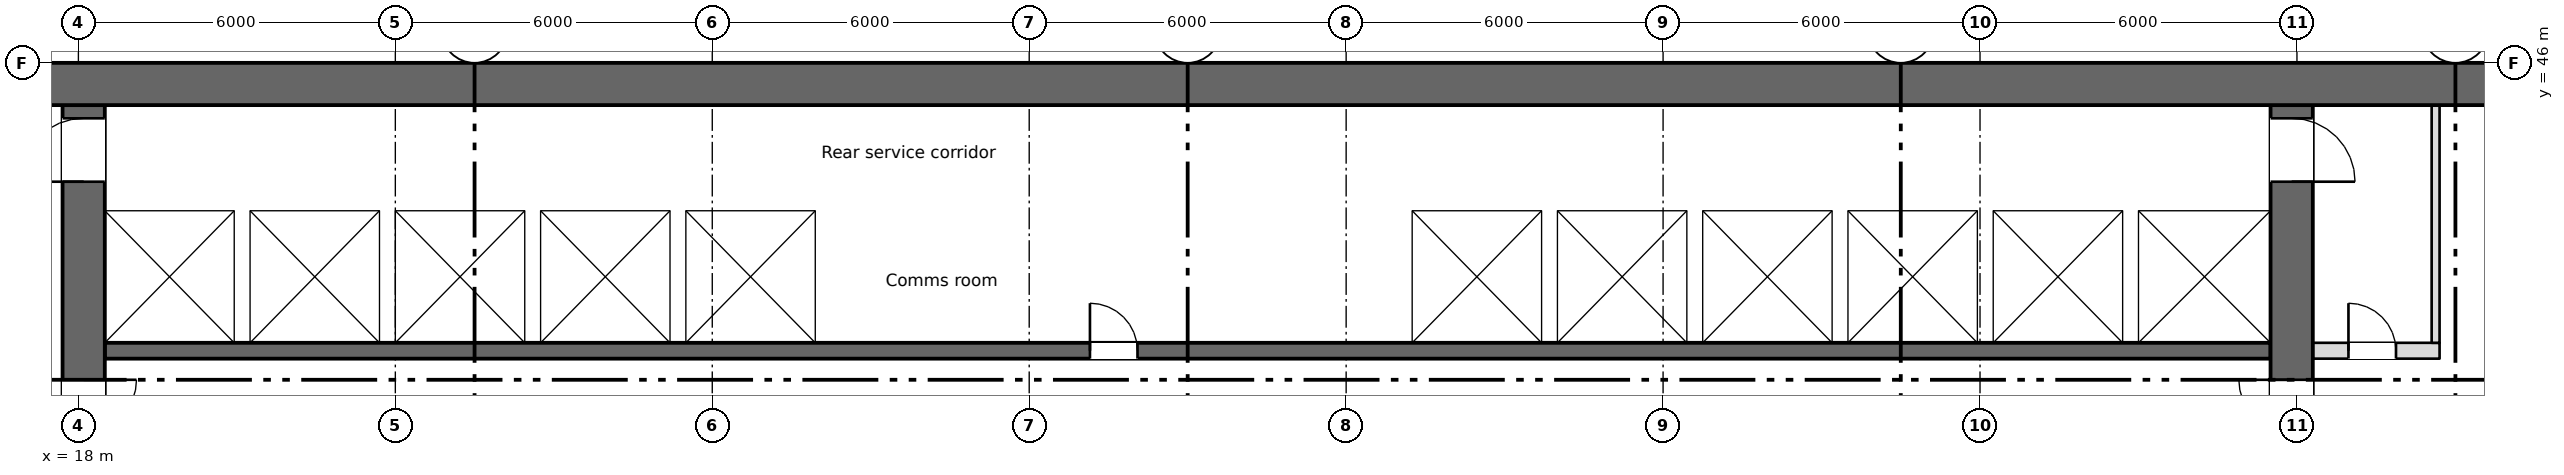
"""IFC4 building model, lengths in metres.
Left out: names, types, materials, properties, quantities, classifications, styles, units other than length and angle.
Written with IfcOpenShell. Run it as: python <this file> out.ifc"""

import sys

from ifc_helpers import new_model, si_unit, direction, frame, frame_2d, origin, place, context, subcontext, project, spatial, rectangle, extrude, element, fill, save


model = new_model("IFC4")
c1 = context("Model", 3, precision=1e-05, world=origin(), true_north=direction((0.0, 1.0)))
c2 = subcontext(c1, "Body", "Model", "MODEL_VIEW")
j1 = project(units=[si_unit("LENGTHUNIT", "METRE"), si_unit("PLANEANGLEUNIT", "RADIAN")], contexts=[c1])
p1 = place(None, origin())
s1 = spatial("IfcSite", under=j1, at=p1, CompositionType="ELEMENT")
p2 = place(p1, origin())
s2 = spatial("IfcBuilding", under=s1, at=p2, CompositionType="ELEMENT")
p3 = place(p2, frame((0.0, 0.0, 98.75)))
s3 = spatial("IfcBuildingStorey", under=s2, at=p3, CompositionType="ELEMENT", Elevation=98.75)
p4 = place(p3, frame((5.55, 45.6, 0.0), z_axis=(0.0, 0.0, 1.0), x_axis=(1.0, 0.0, 0.0)))
e1 = element("IfcWall", 1, at=p4, inside=s3, PredefinedType="SHEAR", context=c2, shape_type="SweptSolid", body=[
    extrude(rectangle(XDim=60.9, YDim=0.8, at=frame_2d((30.45, 0.0))), origin(), (0.0, 0.0, 1.0), 3.35),
])
p5 = place(p4, frame((1.2, 0.0, 0.6)))
e2 = element("IfcOpeningElement", 2, at=p5, cuts=e1, PredefinedType="OPENING", context=c2, shape_type="SweptSolid", body=[
    extrude(rectangle(XDim=0.6, YDim=2.4, at=frame_2d((0.3, 1.2))), frame((0.0, 0.41, 0.0), z_axis=(0.0, -1.0, 0.0), x_axis=(1.0, 0.0, 0.0)), (0.0, 0.0, 1.0), 0.82),
])
p6 = place(p4, frame((7.2, 0.0, 0.6)))
e3 = element("IfcOpeningElement", 3, at=p6, cuts=e1, PredefinedType="OPENING", context=c2, shape_type="SweptSolid", body=[
    extrude(rectangle(XDim=0.6, YDim=2.4, at=frame_2d((0.3, 1.2))), frame((0.0, 0.41, 0.0), z_axis=(0.0, -1.0, 0.0), x_axis=(1.0, 0.0, 0.0)), (0.0, 0.0, 1.0), 0.82),
])
p7 = place(p3, frame((18.1, 28.4, 0.0), z_axis=(0.0, 0.0, 1.0), x_axis=(0.0, 1.0, 0.0)))
e4 = element("IfcWall", 4, at=p7, inside=s3, PredefinedType="SHEAR", context=c2, shape_type="SweptSolid", body=[
    extrude(rectangle(XDim=16.8, YDim=0.8, at=frame_2d((8.4, 0.0))), origin(), (0.0, 0.0, 1.0), 3.35),
])
p8 = place(p7, frame((9.6, 0.0, 0.0)))
e5 = element("IfcOpeningElement", 5, at=p8, cuts=e4, PredefinedType="OPENING", context=c2, shape_type="SweptSolid", body=[
    extrude(rectangle(XDim=2.0, YDim=2.1, at=frame_2d((1.0, 1.05))), frame((0.0, 0.41, 0.0), z_axis=(0.0, -1.0, 0.0), x_axis=(1.0, 0.0, 0.0)), (0.0, 0.0, 1.0), 0.82),
])
p9 = place(p7, frame((15.35, 0.0, 0.0)))
e6 = element("IfcOpeningElement", 6, at=p9, cuts=e4, PredefinedType="OPENING", context=c2, shape_type="SweptSolid", body=[
    extrude(rectangle(XDim=1.2, YDim=2.1, at=frame_2d((0.6, 1.05))), frame((0.0, 0.41, 0.0), z_axis=(0.0, -1.0, 0.0), x_axis=(1.0, 0.0, 0.0)), (0.0, 0.0, 1.0), 0.82),
])
p10 = place(p3, frame((59.9, 28.4, 0.0), z_axis=(0.0, 0.0, 1.0), x_axis=(0.0, 1.0, 0.0)))
e7 = element("IfcWall", 7, at=p10, inside=s3, PredefinedType="SHEAR", context=c2, shape_type="SweptSolid", body=[
    extrude(rectangle(XDim=16.8, YDim=0.8, at=frame_2d((8.4, 0.0))), origin(), (0.0, 0.0, 1.0), 3.35),
])
p11 = place(p10, frame((9.6, 0.0, 0.0)))
e8 = element("IfcOpeningElement", 8, at=p11, cuts=e7, PredefinedType="OPENING", context=c2, shape_type="SweptSolid", body=[
    extrude(rectangle(XDim=2.0, YDim=2.1, at=frame_2d((1.0, 1.05))), frame((0.0, 0.41, 0.0), z_axis=(0.0, -1.0, 0.0), x_axis=(1.0, 0.0, 0.0)), (0.0, 0.0, 1.0), 0.82),
])
p12 = place(p10, frame((15.35, 0.0, 0.0)))
e9 = element("IfcOpeningElement", 9, at=p12, cuts=e7, PredefinedType="OPENING", context=c2, shape_type="SweptSolid", body=[
    extrude(rectangle(XDim=1.2, YDim=2.1, at=frame_2d((0.6, 1.05))), frame((0.0, 0.41, 0.0), z_axis=(0.0, -1.0, 0.0), x_axis=(1.0, 0.0, 0.0)), (0.0, 0.0, 1.0), 0.82),
])
p13 = place(p3, frame((18.5, 40.55, 0.0), z_axis=(0.0, 0.0, 1.0), x_axis=(1.0, 0.0, 0.0)))
e10 = element("IfcWall", 10, at=p13, inside=s3, PredefinedType="SHEAR", context=c2, shape_type="SweptSolid", body=[
    extrude(rectangle(XDim=41.0, YDim=0.3, at=frame_2d((20.5, 0.0))), origin(), (0.0, 0.0, 1.0), 3.35),
])
p14 = place(p13, frame((18.65, 0.0, 0.0)))
e11 = element("IfcOpeningElement", 11, at=p14, cuts=e10, PredefinedType="OPENING", context=c2, shape_type="SweptSolid", body=[
    extrude(rectangle(XDim=0.9, YDim=2.1, at=frame_2d((0.45, 1.05))), frame((0.0, 0.16, 0.0), z_axis=(0.0, -1.0, 0.0), x_axis=(1.0, 0.0, 0.0)), (0.0, 0.0, 1.0), 0.32),
])
p15 = place(p13, frame((6.175, 0.0, 0.0)))
e12 = element("IfcOpeningElement", 12, at=p15, cuts=e10, PredefinedType="OPENING", context=c2, shape_type="SweptSolid", body=[
    extrude(rectangle(XDim=1.1, YDim=2.1, at=frame_2d((0.55, 1.05))), frame((0.0, 0.16, 0.0), z_axis=(0.0, -1.0, 0.0), x_axis=(1.0, 0.0, 0.0)), (0.0, 0.0, 1.0), 0.32),
])
p16 = place(p13, frame((8.925, 0.0, 0.0)))
e13 = element("IfcOpeningElement", 13, at=p16, cuts=e10, PredefinedType="OPENING", context=c2, shape_type="SweptSolid", body=[
    extrude(rectangle(XDim=1.1, YDim=2.1, at=frame_2d((0.55, 1.05))), frame((0.0, 0.16, 0.0), z_axis=(0.0, -1.0, 0.0), x_axis=(1.0, 0.0, 0.0)), (0.0, 0.0, 1.0), 0.32),
])
p17 = place(p13, frame((11.675, 0.0, 0.0)))
e14 = element("IfcOpeningElement", 14, at=p17, cuts=e10, PredefinedType="OPENING", context=c2, shape_type="SweptSolid", body=[
    extrude(rectangle(XDim=1.1, YDim=2.1, at=frame_2d((0.55, 1.05))), frame((0.0, 0.16, 0.0), z_axis=(0.0, -1.0, 0.0), x_axis=(1.0, 0.0, 0.0)), (0.0, 0.0, 1.0), 0.32),
])
p18 = place(p13, frame((30.925, 0.0, 0.0)))
e15 = element("IfcOpeningElement", 15, at=p18, cuts=e10, PredefinedType="OPENING", context=c2, shape_type="SweptSolid", body=[
    extrude(rectangle(XDim=1.1, YDim=2.1, at=frame_2d((0.55, 1.05))), frame((0.0, 0.16, 0.0), z_axis=(0.0, -1.0, 0.0), x_axis=(1.0, 0.0, 0.0)), (0.0, 0.0, 1.0), 0.32),
])
p19 = place(p13, frame((33.675, 0.0, 0.0)))
e16 = element("IfcOpeningElement", 16, at=p19, cuts=e10, PredefinedType="OPENING", context=c2, shape_type="SweptSolid", body=[
    extrude(rectangle(XDim=1.1, YDim=2.1, at=frame_2d((0.55, 1.05))), frame((0.0, 0.16, 0.0), z_axis=(0.0, -1.0, 0.0), x_axis=(1.0, 0.0, 0.0)), (0.0, 0.0, 1.0), 0.32),
])
p20 = place(p13, frame((36.375, 0.0, 0.0)))
e17 = element("IfcOpeningElement", 17, at=p20, cuts=e10, PredefinedType="OPENING", context=c2, shape_type="SweptSolid", body=[
    extrude(rectangle(XDim=1.2, YDim=2.1, at=frame_2d((0.6, 1.05))), frame((0.0, 0.16, 0.0), z_axis=(0.0, -1.0, 0.0), x_axis=(1.0, 0.0, 0.0)), (0.0, 0.0, 1.0), 0.32),
])
p21 = place(p13, frame((39.15, 0.0, 0.0)))
e18 = element("IfcOpeningElement", 18, at=p21, cuts=e10, PredefinedType="OPENING", context=c2, shape_type="SweptSolid", body=[
    extrude(rectangle(XDim=1.2, YDim=2.1, at=frame_2d((0.6, 1.05))), frame((0.0, 0.16, 0.0), z_axis=(0.0, -1.0, 0.0), x_axis=(1.0, 0.0, 0.0)), (0.0, 0.0, 1.0), 0.32),
])
p22 = place(p3, frame((18.5, 43.35, 0.0), z_axis=(0.0, 0.0, 1.0), x_axis=(1.0, 0.0, 0.0)))
e19 = element("IfcWall", 19, at=p22, inside=s3, PredefinedType="SHEAR", context=c2, shape_type="SweptSolid", body=[
    extrude(rectangle(XDim=41.0, YDim=0.3, at=frame_2d((20.5, 0.0))), origin(), (0.0, 0.0, 1.0), 3.35),
])
p23 = place(p3, frame((60.3, 40.55, 0.0), z_axis=(0.0, 0.0, 1.0), x_axis=(1.0, 0.0, 0.0)))
e20 = element("IfcWall", 20, at=p23, inside=s3, PredefinedType="PARTITIONING", context=c2, shape_type="SweptSolid", body=[
    extrude(rectangle(XDim=2.4, YDim=0.3, at=frame_2d((1.2, 0.0))), origin(), (0.0, 0.0, 1.0), 3.35),
])
p24 = place(p23, frame((0.675, 0.0, 0.0)))
e21 = element("IfcOpeningElement", 21, at=p24, cuts=e20, PredefinedType="OPENING", context=c2, shape_type="SweptSolid", body=[
    extrude(rectangle(XDim=0.9, YDim=2.1, at=frame_2d((0.45, 1.05))), frame((0.0, 0.16, 0.0), z_axis=(0.0, -1.0, 0.0), x_axis=(1.0, 0.0, 0.0)), (0.0, 0.0, 1.0), 0.32),
])
for number, where, z_axis, x_axis in (
    (22, (21.1, 40.7, 0.0), (0.0, 0.0, 1.0), (0.0, 1.0, 0.0)),
    (23, (23.85, 40.7, 0.0), (0.0, 0.0, 1.0), (0.0, 1.0, 0.0)),
    (24, (26.6, 40.7, 0.0), (0.0, 0.0, 1.0), (0.0, 1.0, 0.0)),
    (25, (29.35, 40.7, 0.0), (0.0, 0.0, 1.0), (0.0, 1.0, 0.0)),
    (26, (32.1, 40.7, 0.0), (0.0, 0.0, 1.0), (0.0, 1.0, 0.0)),
    (27, (43.1, 40.7, 0.0), (0.0, 0.0, 1.0), (0.0, 1.0, 0.0)),
    (28, (45.85, 40.7, 0.0), (0.0, 0.0, 1.0), (0.0, 1.0, 0.0)),
    (29, (48.6, 40.7, 0.0), (0.0, 0.0, 1.0), (0.0, 1.0, 0.0)),
    (30, (51.35, 40.7, 0.0), (0.0, 0.0, 1.0), (0.0, 1.0, 0.0)),
    (31, (54.1, 40.7, 0.0), (0.0, 0.0, 1.0), (0.0, 1.0, 0.0)),
    (32, (56.85, 40.7, 0.0), (0.0, 0.0, 1.0), (0.0, 1.0, 0.0)),
):
    element("IfcWall", number, at=place(p3, frame(where, z_axis=z_axis, x_axis=x_axis)), inside=s3, PredefinedType="SHEAR", context=c2, shape_type="SweptSolid", body=[
        extrude(rectangle(XDim=2.5, YDim=0.3, at=frame_2d((1.25, 0.0))), origin(), (0.0, 0.0, 1.0), 3.35),
    ])
p25 = place(p3, frame((62.625, 40.7, 0.0), z_axis=(0.0, 0.0, 1.0), x_axis=(0.0, 1.0, 0.0)))
e33 = element("IfcWall", 33, at=p25, inside=s3, PredefinedType="PARTITIONING", context=c2, shape_type="SweptSolid", body=[
    extrude(rectangle(XDim=4.5, YDim=0.15, at=frame_2d((2.25, 0.0))), origin(), (0.0, 0.0, 1.0), 3.35),
])
p26 = place(p24, origin())
e34 = element("IfcDoor", 34, at=p26, inside=s3, OperationType="SINGLE_SWING_LEFT", PredefinedType="DOOR", context=c2, shape_type="SweptSolid", body=[
    extrude(rectangle(XDim=0.9, YDim=2.1, at=frame_2d((0.45, 1.05))), frame((0.0, 0.025, 0.0), z_axis=(0.0, -1.0, 0.0), x_axis=(1.0, 0.0, 0.0)), (0.0, 0.0, 1.0), 0.05),
])
fill(e21, e34)
p27 = place(p14, origin())
e35 = element("IfcDoor", 35, at=p27, inside=s3, OperationType="SINGLE_SWING_LEFT", PredefinedType="DOOR", context=c2, shape_type="SweptSolid", body=[
    extrude(rectangle(XDim=0.9, YDim=2.1, at=frame_2d((0.45, 1.05))), frame((0.0, 0.025, 0.0), z_axis=(0.0, -1.0, 0.0), x_axis=(1.0, 0.0, 0.0)), (0.0, 0.0, 1.0), 0.05),
])
fill(e11, e35)
p28 = place(p15, origin())
e36 = element("IfcDoor", 36, at=p28, inside=s3, OperationType="SLIDING_TO_LEFT", PredefinedType="DOOR", context=c2, shape_type="SweptSolid", body=[
    extrude(rectangle(XDim=1.1, YDim=2.1, at=frame_2d((0.55, 1.05))), frame((0.0, 0.025, 0.0), z_axis=(0.0, -1.0, 0.0), x_axis=(1.0, 0.0, 0.0)), (0.0, 0.0, 1.0), 0.05),
])
fill(e12, e36)
p29 = place(p16, origin())
e37 = element("IfcDoor", 37, at=p29, inside=s3, OperationType="SLIDING_TO_LEFT", PredefinedType="DOOR", context=c2, shape_type="SweptSolid", body=[
    extrude(rectangle(XDim=1.1, YDim=2.1, at=frame_2d((0.55, 1.05))), frame((0.0, 0.025, 0.0), z_axis=(0.0, -1.0, 0.0), x_axis=(1.0, 0.0, 0.0)), (0.0, 0.0, 1.0), 0.05),
])
fill(e13, e37)
p30 = place(p17, origin())
e38 = element("IfcDoor", 38, at=p30, inside=s3, OperationType="SLIDING_TO_LEFT", PredefinedType="DOOR", context=c2, shape_type="SweptSolid", body=[
    extrude(rectangle(XDim=1.1, YDim=2.1, at=frame_2d((0.55, 1.05))), frame((0.0, 0.025, 0.0), z_axis=(0.0, -1.0, 0.0), x_axis=(1.0, 0.0, 0.0)), (0.0, 0.0, 1.0), 0.05),
])
fill(e14, e38)
p31 = place(p18, origin())
e39 = element("IfcDoor", 39, at=p31, inside=s3, OperationType="SLIDING_TO_LEFT", PredefinedType="DOOR", context=c2, shape_type="SweptSolid", body=[
    extrude(rectangle(XDim=1.1, YDim=2.1, at=frame_2d((0.55, 1.05))), frame((0.0, 0.025, 0.0), z_axis=(0.0, -1.0, 0.0), x_axis=(1.0, 0.0, 0.0)), (0.0, 0.0, 1.0), 0.05),
])
fill(e15, e39)
p32 = place(p19, origin())
e40 = element("IfcDoor", 40, at=p32, inside=s3, OperationType="SLIDING_TO_LEFT", PredefinedType="DOOR", context=c2, shape_type="SweptSolid", body=[
    extrude(rectangle(XDim=1.1, YDim=2.1, at=frame_2d((0.55, 1.05))), frame((0.0, 0.025, 0.0), z_axis=(0.0, -1.0, 0.0), x_axis=(1.0, 0.0, 0.0)), (0.0, 0.0, 1.0), 0.05),
])
fill(e16, e40)
p33 = place(p20, origin())
e41 = element("IfcDoor", 41, at=p33, inside=s3, OperationType="SLIDING_TO_LEFT", PredefinedType="DOOR", context=c2, shape_type="SweptSolid", body=[
    extrude(rectangle(XDim=1.2, YDim=2.1, at=frame_2d((0.6, 1.05))), frame((0.0, 0.025, 0.0), z_axis=(0.0, -1.0, 0.0), x_axis=(1.0, 0.0, 0.0)), (0.0, 0.0, 1.0), 0.05),
])
fill(e17, e41)
p34 = place(p21, origin())
e42 = element("IfcDoor", 42, at=p34, inside=s3, OperationType="SLIDING_TO_LEFT", PredefinedType="DOOR", context=c2, shape_type="SweptSolid", body=[
    extrude(rectangle(XDim=1.2, YDim=2.1, at=frame_2d((0.6, 1.05))), frame((0.0, 0.025, 0.0), z_axis=(0.0, -1.0, 0.0), x_axis=(1.0, 0.0, 0.0)), (0.0, 0.0, 1.0), 0.05),
])
fill(e18, e42)
p35 = place(p8, origin())
e43 = element("IfcDoor", 43, at=p35, inside=s3, OperationType="DOUBLE_DOOR_SINGLE_SWING", PredefinedType="DOOR", context=c2, shape_type="SweptSolid", body=[
    extrude(rectangle(XDim=2.0, YDim=2.1, at=frame_2d((1.0, 1.05))), frame((0.0, 0.025, 0.0), z_axis=(0.0, -1.0, 0.0), x_axis=(1.0, 0.0, 0.0)), (0.0, 0.0, 1.0), 0.05),
])
fill(e5, e43)
p36 = place(p11, origin())
e44 = element("IfcDoor", 44, at=p36, inside=s3, OperationType="DOUBLE_DOOR_SINGLE_SWING", PredefinedType="DOOR", context=c2, shape_type="SweptSolid", body=[
    extrude(rectangle(XDim=2.0, YDim=2.1, at=frame_2d((1.0, 1.05))), frame((0.0, 0.025, 0.0), z_axis=(0.0, -1.0, 0.0), x_axis=(1.0, 0.0, 0.0)), (0.0, 0.0, 1.0), 0.05),
])
fill(e8, e44)
p37 = place(p9, origin())
e45 = element("IfcDoor", 45, at=p37, inside=s3, OperationType="SINGLE_SWING_LEFT", PredefinedType="DOOR", context=c2, shape_type="SweptSolid", body=[
    extrude(rectangle(XDim=1.2, YDim=2.1, at=frame_2d((0.6, 1.05))), frame((0.0, 0.025, 0.0), z_axis=(0.0, -1.0, 0.0), x_axis=(1.0, 0.0, 0.0)), (0.0, 0.0, 1.0), 0.05),
])
fill(e6, e45)
p38 = place(p12, origin())
e46 = element("IfcDoor", 46, at=p38, inside=s3, OperationType="SINGLE_SWING_LEFT", PredefinedType="DOOR", context=c2, shape_type="SweptSolid", body=[
    extrude(rectangle(XDim=1.2, YDim=2.1, at=frame_2d((0.6, 1.05))), frame((0.0, 0.025, 0.0), z_axis=(0.0, -1.0, 0.0), x_axis=(1.0, 0.0, 0.0)), (0.0, 0.0, 1.0), 0.05),
])
fill(e9, e46)
save(model, sys.argv[1])
